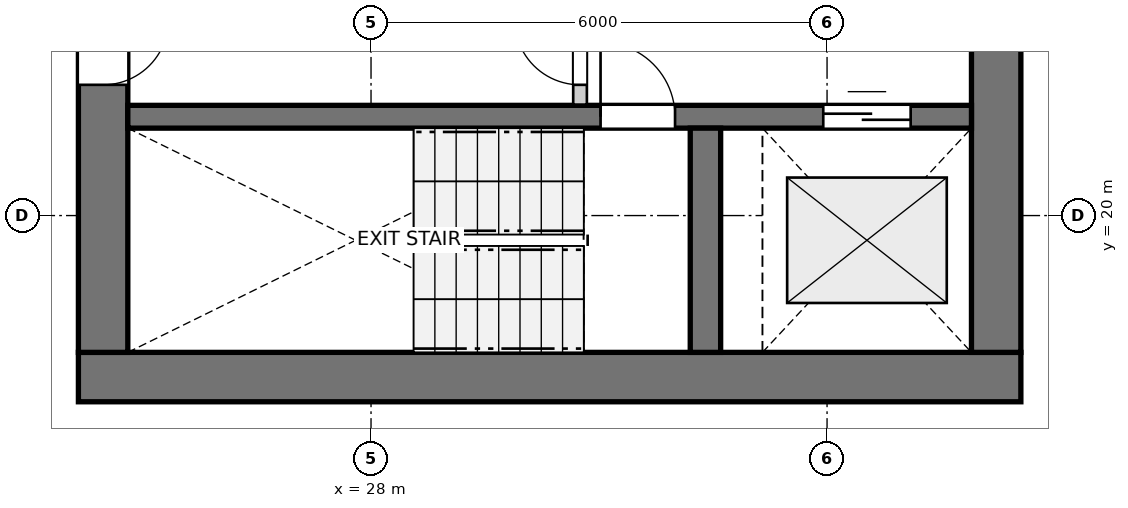
"""IFC4 building model, lengths in metres.
Left out: names, types, materials, properties, quantities, classifications, styles, units other than length and angle.
Written with IfcOpenShell. Run it as: python <this file> out.ifc"""

import sys

from ifc_helpers import new_model, si_unit, direction, frame, frame_2d, origin, place, context, subcontext, project, spatial, rectangle, extrude, source, transform, mapped, element, fill, save


model = new_model("IFC4")
c1 = context("Model", 3, precision=1e-05, world=origin(), true_north=direction((0.0, 1.0)))
c2 = subcontext(c1, "Body", "Model", "MODEL_VIEW")
j1 = project(units=[si_unit("LENGTHUNIT", "METRE"), si_unit("PLANEANGLEUNIT", "RADIAN")], contexts=[c1])
p1 = place(None, origin())
s1 = spatial("IfcSite", under=j1, at=p1, CompositionType="ELEMENT")
p2 = place(p1, origin())
s2 = spatial("IfcBuilding", under=s1, at=p2, CompositionType="ELEMENT")
p3 = place(p2, frame((0.0, 0.0, 73.6)))
s3 = spatial("IfcBuildingStorey", under=s2, at=p3, CompositionType="ELEMENT", Elevation=73.6)
p4 = place(p3, frame((24.15, 17.875, 0.0), z_axis=(0.0, 0.0, 1.0), x_axis=(1.0, 0.0, 0.0)))
e1 = element("IfcWall", 1, at=p4, inside=s3, PredefinedType="SHEAR", context=c2, shape_type="SweptSolid", body=[
    extrude(rectangle(XDim=12.4, YDim=0.65, at=frame_2d((6.2, 0.0))), origin(), (0.0, 0.0, 1.0), 2.95),
])
p5 = place(p3, frame((24.475, 33.8, 0.0), z_axis=(0.0, 0.0, 1.0), x_axis=(0.0, -1.0, 0.0)))
e2 = element("IfcWall", 2, at=p5, inside=s3, PredefinedType="SHEAR", context=c2, shape_type="SweptSolid", body=[
    extrude(rectangle(XDim=15.6, YDim=0.65, at=frame_2d((7.8, 0.0))), origin(), (0.0, 0.0, 1.0), 2.95),
])
p6 = place(p5, frame((7.05, 0.0, 0.0)))
e3 = element("IfcOpeningElement", 3, at=p6, cuts=e2, PredefinedType="OPENING", context=c2, shape_type="SweptSolid", body=[
    extrude(rectangle(XDim=1.5, YDim=2.15, at=frame_2d((0.75, 1.075))), frame((0.0, 0.335, 0.0), z_axis=(0.0, -1.0, 0.0), x_axis=(1.0, 0.0, 0.0)), (0.0, 0.0, 1.0), 0.67),
])
p7 = place(p5, frame((3.52, 0.0, 0.0)))
e4 = element("IfcOpeningElement", 4, at=p7, cuts=e2, PredefinedType="OPENING", context=c2, shape_type="SweptSolid", body=[
    extrude(rectangle(XDim=0.86, YDim=2.05, at=frame_2d((0.43, 1.025))), frame((0.0, 0.335, 0.0), z_axis=(0.0, -1.0, 0.0), x_axis=(1.0, 0.0, 0.0)), (0.0, 0.0, 1.0), 0.67),
])
p8 = place(p5, frame((11.22, 0.0, 0.0)))
e5 = element("IfcOpeningElement", 5, at=p8, cuts=e2, PredefinedType="OPENING", context=c2, shape_type="SweptSolid", body=[
    extrude(rectangle(XDim=0.86, YDim=2.05, at=frame_2d((0.43, 1.025))), frame((0.0, 0.335, 0.0), z_axis=(0.0, -1.0, 0.0), x_axis=(1.0, 0.0, 0.0)), (0.0, 0.0, 1.0), 0.67),
])
p9 = place(p3, frame((36.225, 18.2, 0.0), z_axis=(0.0, 0.0, 1.0), x_axis=(0.0, 1.0, 0.0)))
e6 = element("IfcWall", 6, at=p9, inside=s3, PredefinedType="SHEAR", context=c2, shape_type="SweptSolid", body=[
    extrude(rectangle(XDim=15.6, YDim=0.65, at=frame_2d((7.8, 0.0))), origin(), (0.0, 0.0, 1.0), 2.95),
])
p10 = place(p9, frame((4.25, 0.0, 0.0)))
e7 = element("IfcOpeningElement", 7, at=p10, cuts=e6, PredefinedType="OPENING", context=c2, shape_type="SweptSolid", body=[
    extrude(rectangle(XDim=1.1, YDim=2.15, at=frame_2d((0.55, 1.075))), frame((0.0, 0.335, 0.0), z_axis=(0.0, -1.0, 0.0), x_axis=(1.0, 0.0, 0.0)), (0.0, 0.0, 1.0), 0.67),
])
p11 = place(p9, frame((10.25, 0.0, 0.0)))
e8 = element("IfcOpeningElement", 8, at=p11, cuts=e6, PredefinedType="OPENING", context=c2, shape_type="SweptSolid", body=[
    extrude(rectangle(XDim=1.1, YDim=2.15, at=frame_2d((0.55, 1.075))), frame((0.0, 0.335, 0.0), z_axis=(0.0, -1.0, 0.0), x_axis=(1.0, 0.0, 0.0)), (0.0, 0.0, 1.0), 0.67),
])
p12 = place(p3, frame((24.8, 21.3, 0.0), z_axis=(0.0, 0.0, 1.0), x_axis=(1.0, 0.0, 0.0)))
e9 = element("IfcWall", 9, at=p12, inside=s3, PredefinedType="SHEAR", context=c2, shape_type="SweptSolid", body=[
    extrude(rectangle(XDim=11.1, YDim=0.3, at=frame_2d((5.55, 0.0))), origin(), (0.0, 0.0, 1.0), 2.95),
])
p13 = place(p12, frame((6.22, 0.0, 0.0)))
e10 = element("IfcOpeningElement", 10, at=p13, cuts=e9, PredefinedType="OPENING", context=c2, shape_type="SweptSolid", body=[
    extrude(rectangle(XDim=0.98, YDim=2.15, at=frame_2d((0.49, 1.075))), frame((0.0, 0.16, 0.0), z_axis=(0.0, -1.0, 0.0), x_axis=(1.0, 0.0, 0.0)), (0.0, 0.0, 1.0), 0.32),
])
p14 = place(p12, frame((9.15, 0.0, 0.0)))
e11 = element("IfcOpeningElement", 11, at=p14, cuts=e9, PredefinedType="OPENING", context=c2, shape_type="SweptSolid", body=[
    extrude(rectangle(XDim=1.15, YDim=2.15, at=frame_2d((0.575, 1.075))), frame((0.0, 0.16, 0.0), z_axis=(0.0, -1.0, 0.0), x_axis=(1.0, 0.0, 0.0)), (0.0, 0.0, 1.0), 0.32),
])
p15 = place(p3, frame((32.4, 18.2, 0.0), z_axis=(0.0, 0.0, 1.0), x_axis=(0.0, 1.0, 0.0)))
e12 = element("IfcWall", 12, at=p15, inside=s3, PredefinedType="SHEAR", context=c2, shape_type="SweptSolid", body=[
    extrude(rectangle(XDim=2.95, YDim=0.4, at=frame_2d((1.475, 0.0))), origin(), (0.0, 0.0, 1.0), 2.95),
])
p16 = place(p3, frame((30.75, 21.46, 0.0), z_axis=(0.0, 0.0, 1.0), x_axis=(0.0, 1.0, 0.0)))
e13 = element("IfcWall", 13, at=p16, inside=s3, PredefinedType="PARTITIONING", context=c2, shape_type="SweptSolid", body=[
    extrude(rectangle(XDim=3.11, YDim=0.18, at=frame_2d((1.555, 0.0))), origin(), (0.0, 0.0, 1.0), 2.95),
])
p17 = place(p16, frame((0.26, 0.0, 0.0)))
e14 = element("IfcOpeningElement", 14, at=p17, cuts=e13, PredefinedType="OPENING", context=c2, shape_type="SweptSolid", body=[
    extrude(rectangle(XDim=0.86, YDim=2.05, at=frame_2d((0.43, 1.025))), frame((0.0, 0.1, 0.0), z_axis=(0.0, -1.0, 0.0), x_axis=(1.0, 0.0, 0.0)), (0.0, 0.0, 1.0), 0.2),
])
m1 = source(origin(), c2, "Body", "SweptSolid", [
    extrude(rectangle(XDim=0.98, YDim=2.15, at=frame_2d((0.49, 1.075))), frame((0.0, 0.025, 0.0), z_axis=(0.0, -1.0, 0.0), x_axis=(1.0, 0.0, 0.0)), (0.0, 0.0, 1.0), 0.05),
])
p18 = place(p13, origin())
e15 = element("IfcDoor", 15, at=p18, inside=s3, OperationType="SINGLE_SWING_LEFT", PredefinedType="DOOR", context=c2, shape_type="MappedRepresentation", body=[
    mapped(m1, transform((0.0, 0.0, 0.0), x_axis=(1.0, 0.0, 0.0), y_axis=(0.0, 1.0, 0.0), z_axis=(0.0, 0.0, 1.0), scale=1.0)),
])
fill(e10, e15)
m2 = source(origin(), c2, "Body", "SweptSolid", [
    extrude(rectangle(XDim=1.15, YDim=2.15, at=frame_2d((0.575, 1.075))), frame((0.0, 0.025, 0.0), z_axis=(0.0, -1.0, 0.0), x_axis=(1.0, 0.0, 0.0)), (0.0, 0.0, 1.0), 0.05),
])
p19 = place(p14, origin())
e16 = element("IfcDoor", 16, at=p19, inside=s3, OperationType="DOUBLE_DOOR_SLIDING", PredefinedType="DOOR", context=c2, shape_type="MappedRepresentation", body=[
    mapped(m2, transform((0.0, 0.0, 0.0), x_axis=(1.0, 0.0, 0.0), y_axis=(0.0, 1.0, 0.0), z_axis=(0.0, 0.0, 1.0), scale=1.0)),
])
fill(e11, e16)
m3 = source(origin(), c2, "Body", "SweptSolid", [
    extrude(rectangle(XDim=0.86, YDim=2.05, at=frame_2d((0.43, 1.025))), frame((0.0, 0.025, 0.0), z_axis=(0.0, -1.0, 0.0), x_axis=(1.0, 0.0, 0.0)), (0.0, 0.0, 1.0), 0.05),
])
p20 = place(p8, origin())
e17 = element("IfcDoor", 17, at=p20, inside=s3, OperationType="SINGLE_SWING_LEFT", PredefinedType="DOOR", context=c2, shape_type="MappedRepresentation", body=[
    mapped(m3, transform((0.0, 0.0, 0.0), x_axis=(1.0, 0.0, 0.0), y_axis=(0.0, 1.0, 0.0), z_axis=(0.0, 0.0, 1.0), scale=1.0)),
])
fill(e5, e17)
p21 = place(p17, origin())
e18 = element("IfcDoor", 18, at=p21, inside=s3, OperationType="SINGLE_SWING_RIGHT", PredefinedType="DOOR", context=c2, shape_type="MappedRepresentation", body=[
    mapped(m3, transform((0.0, 0.0, 0.0), x_axis=(1.0, 0.0, 0.0), y_axis=(0.0, 1.0, 0.0), z_axis=(0.0, 0.0, 1.0), scale=1.0)),
])
fill(e14, e18)
save(model, sys.argv[1])
